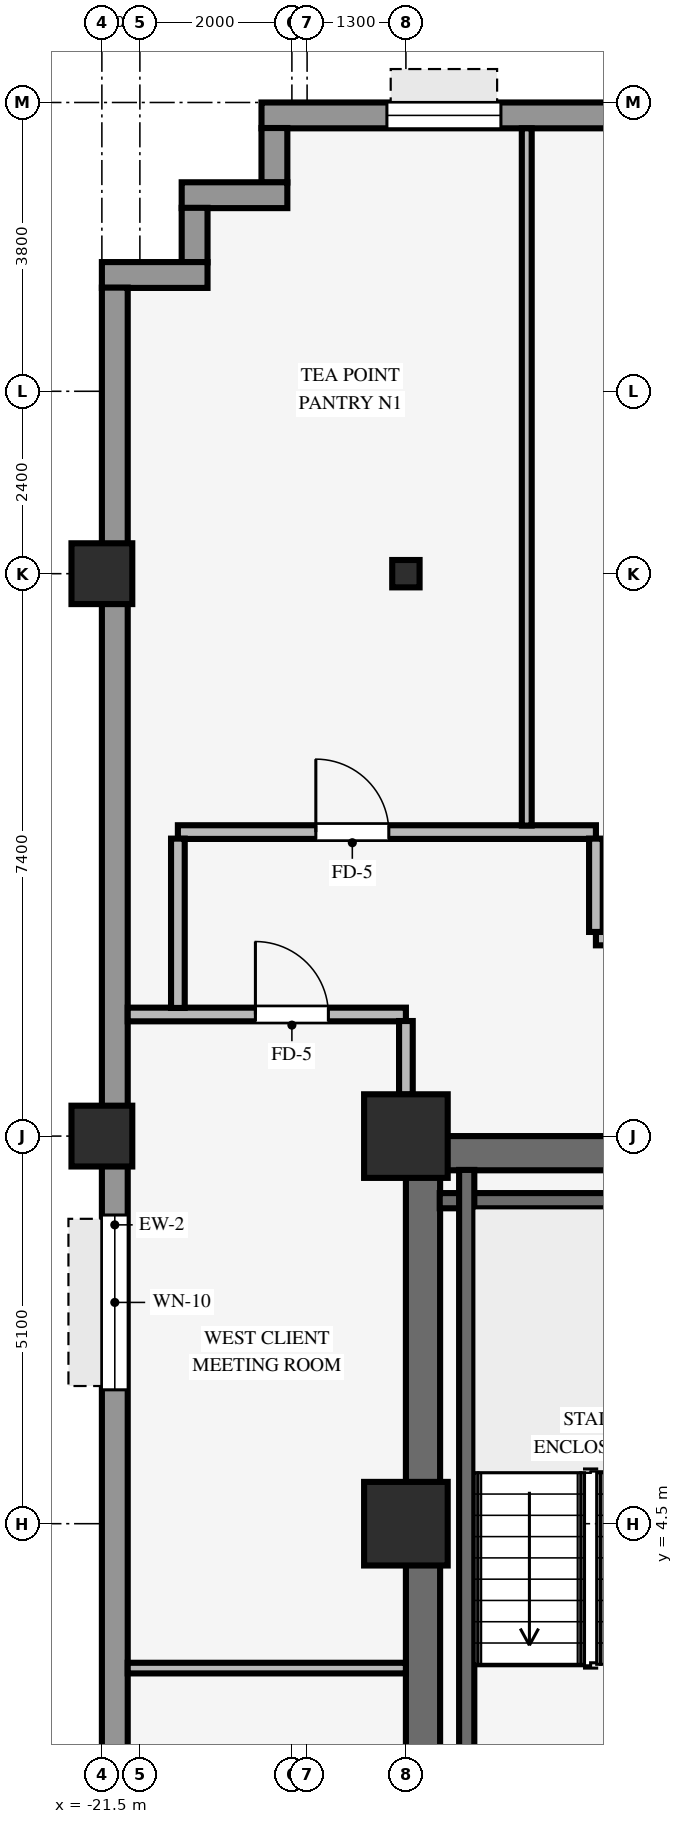
"""IFC4 building model, lengths in metres.
Left out: names, types, materials, properties, quantities, classifications, styles, units other than length and angle.
Written with IfcOpenShell. Run it as: python <this file> out.ifc"""

import sys

from ifc_helpers import new_model, si_unit, direction, frame, frame_2d, origin, origin_2d, place, context, subcontext, project, spatial, rectangle, hollow_rectangle, i_section, extrude, source, transform, mapped, element, fill, save


model = new_model("IFC4")
c1 = context("Model", 3, precision=1e-05, world=origin(), true_north=direction((0.0, 1.0)))
c2 = subcontext(c1, "Body", "Model", "MODEL_VIEW")
j1 = project(units=[si_unit("LENGTHUNIT", "METRE"), si_unit("PLANEANGLEUNIT", "RADIAN")], contexts=[c1])
p1 = place(None, origin())
s1 = spatial("IfcSite", under=j1, at=p1, CompositionType="ELEMENT")
p2 = place(p1, origin())
s2 = spatial("IfcBuilding", under=s1, at=p2, CompositionType="ELEMENT")
p3 = place(p2, frame((0.0, 0.0, 60.45)))
s3 = spatial("IfcBuildingStorey", under=s2, at=p3, CompositionType="ELEMENT", Elevation=60.45)
p4 = place(p3, frame((-17.5, 9.375, 0.0), z_axis=(0.0, 0.0, 1.0), x_axis=(1.0, 0.0, 0.0)))
e1 = element("IfcWall", 1, at=p4, inside=s3, PredefinedType="SHEAR", context=c2, shape_type="SweptSolid", body=[
    extrude(rectangle(XDim=8.5, YDim=0.45, at=frame_2d((4.25, 0.0))), origin(), (0.0, 0.0, 1.0), 3.37),
])
p5 = place(p3, frame((-17.275, -9.155, 0.0), z_axis=(0.0, 0.0, 1.0), x_axis=(0.0, 1.0, 0.0)))
e2 = element("IfcWall", 2, at=p5, inside=s3, PredefinedType="SHEAR", context=c2, shape_type="SweptSolid", body=[
    extrude(rectangle(XDim=18.31, YDim=0.45, at=frame_2d((9.155, 0.0))), origin(), (0.0, 0.0, 1.0), 3.37),
])
for number, where, z_axis, x_axis in (
    (3, (-17.5, 4.5, 0.0), (0.0, 0.0, 1.0), (1.0, 0.0, 0.0)),
    (4, (-17.5, 9.6, 0.0), (0.0, 0.0, 1.0), (1.0, 0.0, 0.0)),
):
    element("IfcColumn", number, at=place(p3, frame(where, z_axis=z_axis, x_axis=x_axis)), inside=s3, PredefinedType="COLUMN", context=c2, shape_type="SweptSolid", body=[
        extrude(rectangle(XDim=1.1, YDim=1.1, at=origin_2d()), origin(), (0.0, 0.0, 1.0), 3.37),
    ])
for number, where, z_axis, x_axis in (
    (5, (-21.5, 9.6, 0.0), (0.0, 0.0, 1.0), (1.0, 0.0, 0.0)),
    (6, (-21.5, 17.0, 0.0), (0.0, 0.0, 1.0), (1.0, 0.0, 0.0)),
):
    element("IfcColumn", number, at=place(p3, frame(where, z_axis=z_axis, x_axis=x_axis)), inside=s3, PredefinedType="COLUMN", context=c2, shape_type="SweptSolid", body=[
        extrude(hollow_rectangle(XDim=0.8, YDim=0.8, WallThickness=0.055, InnerFilletRadius=0.055, OuterFilletRadius=0.11, at=origin_2d()), origin(), (0.0, 0.0, 1.0), 3.37),
    ])
p6 = place(p3, frame((-17.5, 17.0, 0.0), z_axis=(0.0, 0.0, 1.0), x_axis=(1.0, 0.0, 0.0)))
e7 = element("IfcColumn", 7, at=p6, inside=s3, PredefinedType="COLUMN", context=c2, shape_type="SweptSolid", body=[
    extrude(i_section(OverallWidth=0.36, OverallDepth=0.36, WebThickness=0.021, FlangeThickness=0.021, FilletRadius=0.018, at=origin_2d()), origin(), (0.0, 0.0, 1.0), 3.37),
])
p7 = place(p3, frame((-19.4, 23.03, 0.0), z_axis=(0.0, 0.0, 1.0), x_axis=(1.0, 0.0, 0.0)))
e8 = element("IfcWall", 8, at=p7, inside=s3, PredefinedType="STANDARD", context=c2, shape_type="SweptSolid", body=[
    extrude(rectangle(XDim=38.8, YDim=0.34, at=frame_2d((19.4, 0.0))), origin(), (0.0, 0.0, 1.0), 2.705),
])
p8 = place(p7, frame((1.65, 0.0, 0.8)))
e9 = element("IfcOpeningElement", 9, at=p8, cuts=e8, PredefinedType="OPENING", context=c2, shape_type="SweptSolid", body=[
    extrude(rectangle(XDim=1.5, YDim=1.6, at=frame_2d((0.75, 0.8))), frame((0.0, 0.18, 0.0), z_axis=(0.0, -1.0, 0.0), x_axis=(1.0, 0.0, 0.0)), (0.0, 0.0, 1.0), 0.36),
])
p9 = place(p7, frame((7.15, 0.0, 0.8)))
e10 = element("IfcOpeningElement", 10, at=p9, cuts=e8, PredefinedType="OPENING", context=c2, shape_type="SweptSolid", body=[
    extrude(rectangle(XDim=1.5, YDim=1.6, at=frame_2d((0.75, 0.8))), frame((0.0, 0.18, 0.0), z_axis=(0.0, -1.0, 0.0), x_axis=(1.0, 0.0, 0.0)), (0.0, 0.0, 1.0), 0.36),
])
p10 = place(p7, frame((11.75, 0.0, 0.8)))
e11 = element("IfcOpeningElement", 11, at=p10, cuts=e8, PredefinedType="OPENING", context=c2, shape_type="SweptSolid", body=[
    extrude(rectangle(XDim=1.5, YDim=1.6, at=frame_2d((0.75, 0.8))), frame((0.0, 0.18, 0.0), z_axis=(0.0, -1.0, 0.0), x_axis=(1.0, 0.0, 0.0)), (0.0, 0.0, 1.0), 0.36),
])
p11 = place(p7, frame((16.35, 0.0, 0.8)))
e12 = element("IfcOpeningElement", 12, at=p11, cuts=e8, PredefinedType="OPENING", context=c2, shape_type="SweptSolid", body=[
    extrude(rectangle(XDim=1.5, YDim=1.6, at=frame_2d((0.75, 0.8))), frame((0.0, 0.18, 0.0), z_axis=(0.0, -1.0, 0.0), x_axis=(1.0, 0.0, 0.0)), (0.0, 0.0, 1.0), 0.36),
])
p12 = place(p7, frame((20.95, 0.0, 0.8)))
e13 = element("IfcOpeningElement", 13, at=p12, cuts=e8, PredefinedType="OPENING", context=c2, shape_type="SweptSolid", body=[
    extrude(rectangle(XDim=1.5, YDim=1.6, at=frame_2d((0.75, 0.8))), frame((0.0, 0.18, 0.0), z_axis=(0.0, -1.0, 0.0), x_axis=(1.0, 0.0, 0.0)), (0.0, 0.0, 1.0), 0.36),
])
p13 = place(p7, frame((25.55, 0.0, 0.8)))
e14 = element("IfcOpeningElement", 14, at=p13, cuts=e8, PredefinedType="OPENING", context=c2, shape_type="SweptSolid", body=[
    extrude(rectangle(XDim=1.5, YDim=1.6, at=frame_2d((0.75, 0.8))), frame((0.0, 0.18, 0.0), z_axis=(0.0, -1.0, 0.0), x_axis=(1.0, 0.0, 0.0)), (0.0, 0.0, 1.0), 0.36),
])
p14 = place(p7, frame((30.15, 0.0, 0.8)))
e15 = element("IfcOpeningElement", 15, at=p14, cuts=e8, PredefinedType="OPENING", context=c2, shape_type="SweptSolid", body=[
    extrude(rectangle(XDim=1.5, YDim=1.6, at=frame_2d((0.75, 0.8))), frame((0.0, 0.18, 0.0), z_axis=(0.0, -1.0, 0.0), x_axis=(1.0, 0.0, 0.0)), (0.0, 0.0, 1.0), 0.36),
])
p15 = place(p7, frame((34.75, 0.0, 0.8)))
e16 = element("IfcOpeningElement", 16, at=p15, cuts=e8, PredefinedType="OPENING", context=c2, shape_type="SweptSolid", body=[
    extrude(rectangle(XDim=1.5, YDim=1.6, at=frame_2d((0.75, 0.8))), frame((0.0, 0.18, 0.0), z_axis=(0.0, -1.0, 0.0), x_axis=(1.0, 0.0, 0.0)), (0.0, 0.0, 1.0), 0.36),
])
p16 = place(p3, frame((-19.23, 22.146, 0.0), z_axis=(0.0, 0.0, 1.0), x_axis=(0.0, 1.0, 0.0)))
e17 = element("IfcWall", 17, at=p16, inside=s3, PredefinedType="STANDARD", context=c2, shape_type="SweptSolid", body=[
    extrude(rectangle(XDim=0.718, YDim=0.34, at=frame_2d((0.359, 0.0))), origin(), (0.0, 0.0, 1.0), 3.36),
])
p17 = place(p3, frame((-20.45, 21.98, 0.0), z_axis=(0.0, 0.0, 1.0), x_axis=(1.0, 0.0, 0.0)))
e18 = element("IfcWall", 18, at=p17, inside=s3, PredefinedType="STANDARD", context=c2, shape_type="SweptSolid", body=[
    extrude(rectangle(XDim=1.39, YDim=0.34, at=frame_2d((0.695, 0.0))), origin(), (0.0, 0.0, 1.0), 3.36),
])
p18 = place(p3, frame((-20.28, 21.096, 0.0), z_axis=(0.0, 0.0, 1.0), x_axis=(0.0, 1.0, 0.0)))
e19 = element("IfcWall", 19, at=p18, inside=s3, PredefinedType="STANDARD", context=c2, shape_type="SweptSolid", body=[
    extrude(rectangle(XDim=0.718, YDim=0.34, at=frame_2d((0.359, 0.0))), origin(), (0.0, 0.0, 1.0), 3.36),
])
p19 = place(p3, frame((-21.5, 20.93, 0.0), z_axis=(0.0, 0.0, 1.0), x_axis=(1.0, 0.0, 0.0)))
e20 = element("IfcWall", 20, at=p19, inside=s3, PredefinedType="STANDARD", context=c2, shape_type="SweptSolid", body=[
    extrude(rectangle(XDim=1.39, YDim=0.34, at=frame_2d((0.695, 0.0))), origin(), (0.0, 0.0, 1.0), 3.36),
])
p20 = place(p3, frame((-21.33, -20.764, 0.0), z_axis=(0.0, 0.0, 1.0), x_axis=(0.0, 1.0, 0.0)))
e21 = element("IfcWall", 21, at=p20, inside=s3, PredefinedType="STANDARD", context=c2, shape_type="SweptSolid", body=[
    extrude(rectangle(XDim=41.528, YDim=0.34, at=frame_2d((20.764, 0.0))), origin(), (0.0, 0.0, 1.0), 2.705),
])
p21 = place(p20, frame((15.364, 0.0, 0.0)))
e22 = element("IfcOpeningElement", 22, at=p21, cuts=e21, PredefinedType="OPENING", context=c2, shape_type="SweptSolid", body=[
    extrude(rectangle(XDim=1.05, YDim=2.1, at=frame_2d((0.525, 1.05))), frame((0.0, 0.18, 0.0), z_axis=(0.0, -1.0, 0.0), x_axis=(1.0, 0.0, 0.0)), (0.0, 0.0, 1.0), 0.36),
])
p22 = place(p20, frame((12.202, 0.0, 0.8)))
e23 = element("IfcOpeningElement", 23, at=p22, cuts=e21, PredefinedType="OPENING", context=c2, shape_type="SweptSolid", body=[
    extrude(rectangle(XDim=2.3, YDim=1.62, at=frame_2d((1.15, 0.81))), frame((0.0, 0.18, 0.0), z_axis=(0.0, -1.0, 0.0), x_axis=(1.0, 0.0, 0.0)), (0.0, 0.0, 1.0), 0.36),
])
p23 = place(p20, frame((17.144, 0.0, 0.8)))
e24 = element("IfcOpeningElement", 24, at=p23, cuts=e21, PredefinedType="OPENING", context=c2, shape_type="SweptSolid", body=[
    extrude(rectangle(XDim=2.3, YDim=1.62, at=frame_2d((1.15, 0.81))), frame((0.0, 0.18, 0.0), z_axis=(0.0, -1.0, 0.0), x_axis=(1.0, 0.0, 0.0)), (0.0, 0.0, 1.0), 0.36),
])
p24 = place(p20, frame((27.025, 0.0, 0.8)))
e25 = element("IfcOpeningElement", 25, at=p24, cuts=e21, PredefinedType="OPENING", context=c2, shape_type="SweptSolid", body=[
    extrude(rectangle(XDim=2.3, YDim=1.62, at=frame_2d((1.15, 0.81))), frame((0.0, 0.18, 0.0), z_axis=(0.0, -1.0, 0.0), x_axis=(1.0, 0.0, 0.0)), (0.0, 0.0, 1.0), 0.36),
])
p25 = place(p3, frame((-17.055, 8.75, 0.0), z_axis=(0.0, 0.0, 1.0), x_axis=(1.0, 0.0, 0.0)))
e26 = element("IfcWall", 26, at=p25, inside=s3, PredefinedType="SHEAR", context=c2, shape_type="SweptSolid", body=[
    extrude(rectangle(XDim=3.52, YDim=0.2, at=frame_2d((1.76, 0.0))), origin(), (0.0, 0.0, 1.0), 3.37),
])
p26 = place(p3, frame((-16.7, 1.095, 0.0), z_axis=(0.0, 0.0, 1.0), x_axis=(0.0, 1.0, 0.0)))
e27 = element("IfcWall", 27, at=p26, inside=s3, PredefinedType="SHEAR", context=c2, shape_type="SweptSolid", body=[
    extrude(rectangle(XDim=8.06, YDim=0.2, at=frame_2d((4.03, 0.0))), origin(), (0.0, 0.0, 1.0), 3.37),
])
p27 = place(p3, frame((-21.16, 2.6, 0.0), z_axis=(0.0, 0.0, 1.0), x_axis=(1.0, 0.0, 0.0)))
e28 = element("IfcWall", 28, at=p27, inside=s3, PredefinedType="PARTITIONING", context=c2, shape_type="SweptSolid", body=[
    extrude(rectangle(XDim=3.66, YDim=0.14, at=frame_2d((1.83, 0.0))), origin(), (0.0, 0.0, 1.0), 3.36),
])
p28 = place(p3, frame((-21.16, 11.2, 0.0), z_axis=(0.0, 0.0, 1.0), x_axis=(1.0, 0.0, 0.0)))
e29 = element("IfcWall", 29, at=p28, inside=s3, PredefinedType="PARTITIONING", context=c2, shape_type="SweptSolid", body=[
    extrude(rectangle(XDim=3.66, YDim=0.18, at=frame_2d((1.83, 0.0))), origin(), (0.0, 0.0, 1.0), 3.36),
])
p29 = place(p28, frame((1.68, 0.0, 0.0)))
e30 = element("IfcOpeningElement", 30, at=p29, cuts=e29, PredefinedType="OPENING", context=c2, shape_type="SweptSolid", body=[
    extrude(rectangle(XDim=0.96, YDim=2.1, at=frame_2d((0.48, 1.05))), frame((0.0, 0.1, 0.0), z_axis=(0.0, -1.0, 0.0), x_axis=(1.0, 0.0, 0.0)), (0.0, 0.0, 1.0), 0.2),
])
p30 = place(p3, frame((-15.0, 12.2, 0.0), z_axis=(0.0, 0.0, 1.0), x_axis=(1.0, 0.0, 0.0)))
e31 = element("IfcWall", 31, at=p30, inside=s3, PredefinedType="PARTITIONING", context=c2, shape_type="SweptSolid", body=[
    extrude(rectangle(XDim=30.0, YDim=0.18, at=frame_2d((15.0, 0.0))), origin(), (0.0, 0.0, 1.0), 3.36),
])
p31 = place(p30, frame((2.195, 0.0, 0.0)))
e32 = element("IfcOpeningElement", 32, at=p31, cuts=e31, PredefinedType="OPENING", context=c2, shape_type="SweptSolid", body=[
    extrude(rectangle(XDim=0.96, YDim=2.1, at=frame_2d((0.48, 1.05))), frame((0.0, 0.1, 0.0), z_axis=(0.0, -1.0, 0.0), x_axis=(1.0, 0.0, 0.0)), (0.0, 0.0, 1.0), 0.2),
])
p32 = place(p30, frame((16.395, 0.0, 0.0)))
e33 = element("IfcOpeningElement", 33, at=p32, cuts=e31, PredefinedType="OPENING", context=c2, shape_type="SweptSolid", body=[
    extrude(rectangle(XDim=0.96, YDim=2.1, at=frame_2d((0.48, 1.05))), frame((0.0, 0.1, 0.0), z_axis=(0.0, -1.0, 0.0), x_axis=(1.0, 0.0, 0.0)), (0.0, 0.0, 1.0), 0.2),
])
p33 = place(p30, frame((21.62, 0.0, 0.0)))
e34 = element("IfcOpeningElement", 34, at=p33, cuts=e31, PredefinedType="OPENING", context=c2, shape_type="SweptSolid", body=[
    extrude(rectangle(XDim=0.96, YDim=2.1, at=frame_2d((0.48, 1.05))), frame((0.0, 0.1, 0.0), z_axis=(0.0, -1.0, 0.0), x_axis=(1.0, 0.0, 0.0)), (0.0, 0.0, 1.0), 0.2),
])
p34 = place(p30, frame((7.33, 0.0, 0.0)))
e35 = element("IfcOpeningElement", 35, at=p34, cuts=e31, PredefinedType="OPENING", context=c2, shape_type="SweptSolid", body=[
    extrude(rectangle(XDim=0.96, YDim=2.1, at=frame_2d((0.48, 1.05))), frame((0.0, 0.1, 0.0), z_axis=(0.0, -1.0, 0.0), x_axis=(1.0, 0.0, 0.0)), (0.0, 0.0, 1.0), 0.2),
])
p35 = place(p30, frame((26.08, 0.0, 0.0)))
e36 = element("IfcOpeningElement", 36, at=p35, cuts=e31, PredefinedType="OPENING", context=c2, shape_type="SweptSolid", body=[
    extrude(rectangle(XDim=0.96, YDim=2.1, at=frame_2d((0.48, 1.05))), frame((0.0, 0.1, 0.0), z_axis=(0.0, -1.0, 0.0), x_axis=(1.0, 0.0, 0.0)), (0.0, 0.0, 1.0), 0.2),
])
p36 = place(p30, frame((12.52, 0.0, 0.0)))
e37 = element("IfcOpeningElement", 37, at=p36, cuts=e31, PredefinedType="OPENING", context=c2, shape_type="SweptSolid", body=[
    extrude(rectangle(XDim=0.96, YDim=2.1, at=frame_2d((0.48, 1.05))), frame((0.0, 0.1, 0.0), z_axis=(0.0, -1.0, 0.0), x_axis=(1.0, 0.0, 0.0)), (0.0, 0.0, 1.0), 0.2),
])
p37 = place(p3, frame((-20.5, 13.6, 0.0), z_axis=(0.0, 0.0, 1.0), x_axis=(1.0, 0.0, 0.0)))
e38 = element("IfcWall", 38, at=p37, inside=s3, PredefinedType="PARTITIONING", context=c2, shape_type="SweptSolid", body=[
    extrude(rectangle(XDim=5.5, YDim=0.18, at=frame_2d((2.75, 0.0))), origin(), (0.0, 0.0, 1.0), 2.942),
])
p38 = place(p37, frame((1.815, 0.0, 0.0)))
e39 = element("IfcOpeningElement", 39, at=p38, cuts=e38, PredefinedType="OPENING", context=c2, shape_type="SweptSolid", body=[
    extrude(rectangle(XDim=0.96, YDim=2.1, at=frame_2d((0.48, 1.05))), frame((0.0, 0.1, 0.0), z_axis=(0.0, -1.0, 0.0), x_axis=(1.0, 0.0, 0.0)), (0.0, 0.0, 1.0), 0.2),
])
p39 = place(p3, frame((-20.5, 11.286, 0.0), z_axis=(0.0, 0.0, 1.0), x_axis=(0.0, 1.0, 0.0)))
e40 = element("IfcWall", 40, at=p39, inside=s3, PredefinedType="PARTITIONING", context=c2, shape_type="SweptSolid", body=[
    extrude(rectangle(XDim=2.228, YDim=0.18, at=frame_2d((1.114, 0.0))), origin(), (0.0, 0.0, 1.0), 3.36),
])
p40 = place(p3, frame((-17.5, 10.146, 0.0), z_axis=(0.0, 0.0, 1.0), x_axis=(0.0, 1.0, 0.0)))
e41 = element("IfcWall", 41, at=p40, inside=s3, PredefinedType="PARTITIONING", context=c2, shape_type="SweptSolid", body=[
    extrude(rectangle(XDim=0.968, YDim=0.18, at=frame_2d((0.484, 0.0))), origin(), (0.0, 0.0, 1.0), 2.738),
])
p41 = place(p3, frame((-15.91, 13.686, 0.0), z_axis=(0.0, 0.0, 1.0), x_axis=(0.0, 1.0, 0.0)))
e42 = element("IfcWall", 42, at=p41, inside=s3, PredefinedType="PARTITIONING", context=c2, shape_type="SweptSolid", body=[
    extrude(rectangle(XDim=9.174, YDim=0.13, at=frame_2d((4.587, 0.0))), origin(), (0.0, 0.0, 1.0), 3.36),
])
p42 = place(p3, frame((-15.0, 12.286, 0.0), z_axis=(0.0, 0.0, 1.0), x_axis=(0.0, 1.0, 0.0)))
e43 = element("IfcWall", 43, at=p42, inside=s3, PredefinedType="PARTITIONING", context=c2, shape_type="SweptSolid", body=[
    extrude(rectangle(XDim=1.228, YDim=0.18, at=frame_2d((0.614, 0.0))), origin(), (0.0, 0.0, 1.0), 3.36),
])
m1 = source(origin(), c2, "Body", "SweptSolid", [
    extrude(rectangle(XDim=1.5, YDim=1.6, at=frame_2d((0.75, 0.8))), frame((0.0, 0.03, 0.0), z_axis=(0.0, -1.0, 0.0), x_axis=(1.0, 0.0, 0.0)), (0.0, 0.0, 1.0), 0.06),
])
p43 = place(p8, origin())
e44 = element("IfcWindow", 44, at=p43, inside=s3, PartitioningType="SINGLE_PANEL", PredefinedType="WINDOW", context=c2, shape_type="MappedRepresentation", body=[
    mapped(m1, transform((0.0, 0.0, 0.0), scale=1.0)),
])
fill(e9, e44)
m2 = source(origin(), c2, "Body", "SweptSolid", [
    extrude(rectangle(XDim=2.3, YDim=1.62, at=frame_2d((1.15, 0.81))), frame((0.0, 0.03, 0.0), z_axis=(0.0, -1.0, 0.0), x_axis=(1.0, 0.0, 0.0)), (0.0, 0.0, 1.0), 0.06),
])
p44 = place(p24, origin())
e45 = element("IfcWindow", 45, at=p44, inside=s3, PartitioningType="SINGLE_PANEL", PredefinedType="WINDOW", context=c2, shape_type="MappedRepresentation", body=[
    mapped(m2, transform((0.0, 0.0, 0.0), scale=1.0)),
])
fill(e25, e45)
m3 = source(origin(), c2, "Body", "SweptSolid", [
    extrude(rectangle(XDim=0.96, YDim=2.1, at=frame_2d((0.48, 1.05))), frame((0.0, 0.025, 0.0), z_axis=(0.0, -1.0, 0.0), x_axis=(1.0, 0.0, 0.0)), (0.0, 0.0, 1.0), 0.05),
])
p45 = place(p38, origin())
e46 = element("IfcDoor", 46, at=p45, inside=s3, OperationType="SINGLE_SWING_LEFT", PredefinedType="DOOR", context=c2, shape_type="MappedRepresentation", body=[
    mapped(m3, transform((0.0, 0.0, 0.0), scale=1.0)),
])
fill(e39, e46)
p46 = place(p29, origin())
e47 = element("IfcDoor", 47, at=p46, inside=s3, OperationType="SINGLE_SWING_LEFT", PredefinedType="DOOR", context=c2, shape_type="MappedRepresentation", body=[
    mapped(m3, transform((0.0, 0.0, 0.0), scale=1.0)),
])
fill(e30, e47)
save(model, sys.argv[1])
